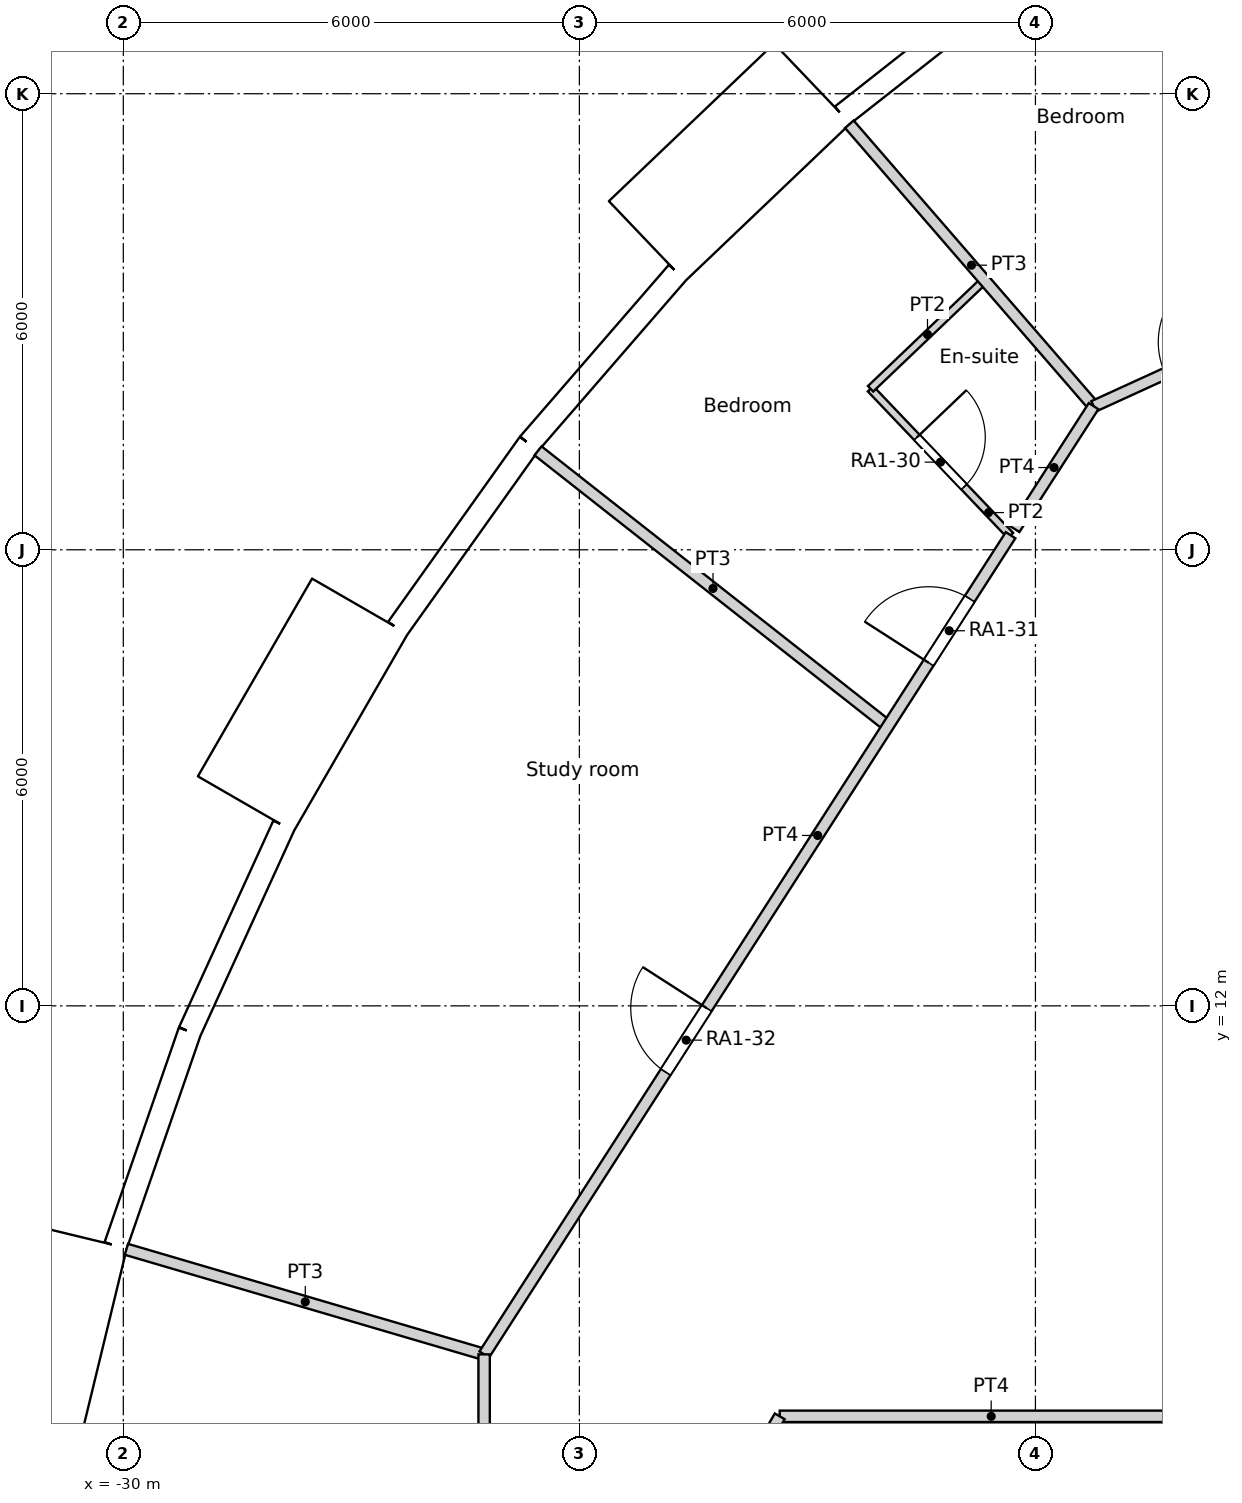
"""IFC4 building model, lengths in metres.
Left out: names, types, materials, properties, quantities, classifications, styles, units other than length and angle.
Written with IfcOpenShell. Run it as: python <this file> out.ifc"""

import sys

from ifc_helpers import new_model, si_unit, direction, frame, frame_2d, origin, origin_2d, place, context, subcontext, project, spatial, rectangle, circle, extrude, element, fill, save


model = new_model("IFC4")
c1 = context("Model", 3, precision=1e-05, world=origin(), true_north=direction((0.0, 1.0)))
c2 = subcontext(c1, "Body", "Model", "MODEL_VIEW")
j1 = project(units=[si_unit("LENGTHUNIT", "METRE"), si_unit("PLANEANGLEUNIT", "RADIAN")], contexts=[c1])
p1 = place(None, origin())
s1 = spatial("IfcSite", under=j1, at=p1, CompositionType="ELEMENT")
p2 = place(p1, origin())
s2 = spatial("IfcBuilding", under=s1, at=p2, CompositionType="ELEMENT")
p3 = place(p2, frame((0.0, 0.0, 28.2)))
s3 = spatial("IfcBuildingStorey", under=s2, at=p3, CompositionType="ELEMENT", Elevation=28.2)
for number, where, z_axis, x_axis in (
    (1, (-19.826, 22.88, 0.0), (0.0, 0.0, 1.0), (1.0, 0.0, 0.0)),
    (2, (-23.797, 18.715, 0.0), (0.0, 0.0, 1.0), (1.0, 0.0, 0.0)),
    (3, (-26.909, 13.873, 0.0), (0.0, 0.0, 1.0), (1.0, 0.0, 0.0)),
    (4, (-29.048, 8.529, 0.0), (0.0, 0.0, 1.0), (1.0, 0.0, 0.0)),
):
    element("IfcColumn", number, at=place(p3, frame(where, z_axis=z_axis, x_axis=x_axis)), inside=s3, PredefinedType="COLUMN", context=c2, shape_type="SweptSolid", body=[
        extrude(circle(Radius=0.7, at=origin_2d()), origin(), (0.0, 0.0, 1.0), 3.6),
    ])
for number, where, z_axis, x_axis in (
    (5, (-16.846, 17.855, 0.0), (0.0, 0.0, 1.0), (1.0, 0.0, 0.0)),
    (6, (-20.509, 13.489, 0.0), (0.0, 0.0, 1.0), (1.0, 0.0, 0.0)),
    (7, (-23.067, 8.396, 0.0), (0.0, 0.0, 1.0), (1.0, 0.0, 0.0)),
):
    element("IfcColumn", number, at=place(p3, frame(where, z_axis=z_axis, x_axis=x_axis)), inside=s3, PredefinedType="COLUMN", context=c2, shape_type="SweptSolid", body=[
        extrude(circle(Radius=0.75, at=origin_2d()), origin(), (0.0, 0.0, 1.0), 3.6),
    ])
p4 = place(p3, frame((-16.958, 8.167, 0.0), z_axis=(0.0, 0.0, 1.0), x_axis=(1.0, 0.0, 0.0)))
e8 = element("IfcColumn", 8, at=p4, inside=s3, PredefinedType="COLUMN", context=c2, shape_type="SweptSolid", body=[
    extrude(circle(Radius=0.8, at=origin_2d()), origin(), (0.0, 0.0, 1.0), 3.6),
])
p5 = place(p3, frame((-18.199, 25.557, 0.0), z_axis=(0.0, 0.0, 1.0), x_axis=(-0.786053834673, -0.618158045322, 0.0)))
e9 = element("IfcWall", 9, at=p5, inside=s3, PredefinedType="SOLIDWALL", context=c2, shape_type="SweptSolid", body=[
    extrude(rectangle(XDim=2.979, YDim=0.3, at=frame_2d((1.49, 0.0))), origin(), (0.0, 0.0, 1.0), 3.15),
])
p6 = place(p5, frame((1.49, 0.0, 1.55)))
e10 = element("IfcOpeningElement", 10, at=p6, cuts=e9, PredefinedType="OPENING", context=c2, shape_type="SweptSolid", body=[
    extrude(circle(Radius=0.9, at=origin_2d()), frame((0.0, 0.16, 0.0), z_axis=(0.0, -1.0, 0.0), x_axis=(1.0, 0.0, 0.0)), (0.0, 0.0, 1.0), 0.32),
])
p7 = place(p3, frame((-20.938, 24.132, -0.45), z_axis=(0.0, 0.0, 1.0), x_axis=(-0.723712023899, -0.690102098579, 0.0)))
e11 = element("IfcWall", 11, at=p7, inside=s3, PredefinedType="ELEMENTEDWALL", context=c2, shape_type="SweptSolid", body=[
    extrude(rectangle(XDim=3.0, YDim=1.45, at=frame_2d((1.5, 0.0))), origin(), (0.0, 0.0, 1.0), 3.6),
])
p8 = place(p7, frame((1.5, 0.0, 2.0)))
e12 = element("IfcOpeningElement", 12, at=p8, cuts=e11, PredefinedType="OPENING", context=c2, shape_type="SweptSolid", body=[
    extrude(circle(Radius=0.9, at=origin_2d()), frame((0.0, 0.735, 0.0), z_axis=(0.0, -1.0, 0.0), x_axis=(1.0, 0.0, 0.0)), (0.0, 0.0, 1.0), 1.47),
])
p9 = place(p3, frame((-22.711, 21.646, 0.0), z_axis=(0.0, 0.0, 1.0), x_axis=(-0.654830712471, -0.755775587066, 0.0)))
e13 = element("IfcWall", 13, at=p9, inside=s3, PredefinedType="SOLIDWALL", context=c2, shape_type="SweptSolid", body=[
    extrude(rectangle(XDim=2.98, YDim=0.3, at=frame_2d((1.49, 0.0))), origin(), (0.0, 0.0, 1.0), 3.15),
])
p10 = place(p9, frame((1.49, 0.0, 1.55)))
e14 = element("IfcOpeningElement", 14, at=p10, cuts=e13, PredefinedType="OPENING", context=c2, shape_type="SweptSolid", body=[
    extrude(circle(Radius=0.9, at=origin_2d()), frame((0.0, 0.16, 0.0), z_axis=(0.0, -1.0, 0.0), x_axis=(1.0, 0.0, 0.0)), (0.0, 0.0, 1.0), 0.32),
])
p11 = place(p3, frame((-24.662, 19.394, 0.0), z_axis=(0.0, 0.0, 1.0), x_axis=(-0.580113774115, -0.814535456, 0.0)))
e15 = element("IfcWall", 15, at=p11, inside=s3, PredefinedType="SOLIDWALL", context=c2, shape_type="SweptSolid", body=[
    extrude(rectangle(XDim=2.98, YDim=0.3, at=frame_2d((1.49, 0.0))), origin(), (0.0, 0.0, 1.0), 3.15),
])
p12 = place(p11, frame((1.49, 0.0, 1.55)))
e16 = element("IfcOpeningElement", 16, at=p12, cuts=e15, PredefinedType="OPENING", context=c2, shape_type="SweptSolid", body=[
    extrude(circle(Radius=0.9, at=origin_2d()), frame((0.0, 0.16, 0.0), z_axis=(0.0, -1.0, 0.0), x_axis=(1.0, 0.0, 0.0)), (0.0, 0.0, 1.0), 0.32),
])
p13 = place(p3, frame((-26.888, 17.256, -0.45), z_axis=(0.0, 0.0, 1.0), x_axis=(-0.499990139034, -0.866031096941, 0.0)))
e17 = element("IfcWall", 17, at=p13, inside=s3, PredefinedType="ELEMENTEDWALL", context=c2, shape_type="SweptSolid", body=[
    extrude(rectangle(XDim=3.0, YDim=1.45, at=frame_2d((1.5, 0.0))), origin(), (0.0, 0.0, 1.0), 3.6),
])
p14 = place(p13, frame((1.5, 0.0, 2.0)))
e18 = element("IfcOpeningElement", 18, at=p14, cuts=e17, PredefinedType="OPENING", context=c2, shape_type="SweptSolid", body=[
    extrude(circle(Radius=0.9, at=origin_2d()), frame((0.0, 0.735, 0.0), z_axis=(0.0, -1.0, 0.0), x_axis=(1.0, 0.0, 0.0)), (0.0, 0.0, 1.0), 1.47),
])
p15 = place(p3, frame((-27.889, 14.371, 0.0), z_axis=(0.0, 0.0, 1.0), x_axis=(-0.415407317162, -0.909635509888, 0.0)))
e19 = element("IfcWall", 19, at=p15, inside=s3, PredefinedType="SOLIDWALL", context=c2, shape_type="SweptSolid", body=[
    extrude(rectangle(XDim=2.98, YDim=0.3, at=frame_2d((1.49, 0.0))), origin(), (0.0, 0.0, 1.0), 3.15),
])
p16 = place(p15, frame((1.49, 0.0, 1.55)))
e20 = element("IfcOpeningElement", 20, at=p16, cuts=e19, PredefinedType="OPENING", context=c2, shape_type="SweptSolid", body=[
    extrude(circle(Radius=0.9, at=origin_2d()), frame((0.0, 0.16, 0.0), z_axis=(0.0, -1.0, 0.0), x_axis=(1.0, 0.0, 0.0)), (0.0, 0.0, 1.0), 0.32),
])
p17 = place(p3, frame((-29.127, 11.661, 0.0), z_axis=(0.0, 0.0, 1.0), x_axis=(-0.327096492592, -0.944990944154, 0.0)))
e21 = element("IfcWall", 21, at=p17, inside=s3, PredefinedType="SOLIDWALL", context=c2, shape_type="SweptSolid", body=[
    extrude(rectangle(XDim=2.979, YDim=0.3, at=frame_2d((1.49, 0.0))), origin(), (0.0, 0.0, 1.0), 3.15),
])
p18 = place(p17, frame((1.49, 0.0, 1.55)))
e22 = element("IfcOpeningElement", 22, at=p18, cuts=e21, PredefinedType="OPENING", context=c2, shape_type="SweptSolid", body=[
    extrude(circle(Radius=0.9, at=origin_2d()), frame((0.0, 0.16, 0.0), z_axis=(0.0, -1.0, 0.0), x_axis=(1.0, 0.0, 0.0)), (0.0, 0.0, 1.0), 0.32),
])
p19 = place(p3, frame((-30.661, 8.982, -0.45), z_axis=(0.0, 0.0, 1.0), x_axis=(-0.235751415068, -0.971813392732, 0.0)))
e23 = element("IfcWall", 23, at=p19, inside=s3, PredefinedType="ELEMENTEDWALL", context=c2, shape_type="SweptSolid", body=[
    extrude(rectangle(XDim=3.0, YDim=1.45, at=frame_2d((1.5, 0.0))), origin(), (0.0, 0.0, 1.0), 3.6),
])
p20 = place(p19, frame((1.5, 0.0, 2.0)))
e24 = element("IfcOpeningElement", 24, at=p20, cuts=e23, PredefinedType="OPENING", context=c2, shape_type="SweptSolid", body=[
    extrude(circle(Radius=0.9, at=origin_2d()), frame((0.0, 0.735, 0.0), z_axis=(0.0, -1.0, 0.0), x_axis=(1.0, 0.0, 0.0)), (0.0, 0.0, 1.0), 1.47),
])
p21 = place(p3, frame((-17.234, 19.888, 0.0), z_axis=(0.0, 0.0, 1.0), x_axis=(0.90953867323, 0.415619299238, 0.0)))
e25 = element("IfcWall", 25, at=p21, inside=s3, PredefinedType="PARTITIONING", context=c2, shape_type="SweptSolid", body=[
    extrude(rectangle(XDim=14.829, YDim=0.15, at=frame_2d((7.415, 0.0))), origin(), (0.0, 0.0, 1.0), 3.15),
])
p22 = place(p21, frame((12.797, 0.0, 0.0)))
e26 = element("IfcOpeningElement", 26, at=p22, cuts=e25, PredefinedType="OPENING", context=c2, shape_type="SweptSolid", body=[
    extrude(rectangle(XDim=1.0, YDim=2.1, at=frame_2d((0.5, 1.05))), frame((0.0, 0.075, 0.0), z_axis=(0.0, -1.0, 0.0), x_axis=(1.0, 0.0, 0.0)), (0.0, 0.0, 1.0), 0.15),
])
p23 = place(p21, frame((7.877, 0.0, 0.0)))
e27 = element("IfcOpeningElement", 27, at=p23, cuts=e25, PredefinedType="OPENING", context=c2, shape_type="SweptSolid", body=[
    extrude(rectangle(XDim=1.0, YDim=2.1, at=frame_2d((0.5, 1.05))), frame((0.0, 0.075, 0.0), z_axis=(0.0, -1.0, 0.0), x_axis=(1.0, 0.0, 0.0)), (0.0, 0.0, 1.0), 0.15),
])
p24 = place(p21, frame((1.034, 0.0, 0.0)))
e28 = element("IfcOpeningElement", 28, at=p24, cuts=e25, PredefinedType="OPENING", context=c2, shape_type="SweptSolid", body=[
    extrude(rectangle(XDim=1.0, YDim=2.1, at=frame_2d((0.5, 1.05))), frame((0.0, 0.075, 0.0), z_axis=(0.0, -1.0, 0.0), x_axis=(1.0, 0.0, 0.0)), (0.0, 0.0, 1.0), 0.15),
])
p25 = place(p3, frame((-18.274, 18.274, 0.0), z_axis=(0.0, 0.0, 1.0), x_axis=(0.540751168176, 0.841182604502, 0.0)))
e29 = element("IfcWall", 29, at=p25, inside=s3, PredefinedType="PARTITIONING", context=c2, shape_type="SweptSolid", body=[
    extrude(rectangle(XDim=1.921, YDim=0.15, at=frame_2d((0.96, 0.0))), origin(), (0.0, 0.0, 1.0), 3.15),
])
p26 = place(p3, frame((-21.364, 6.6, 0.0), z_axis=(0.0, 0.0, 1.0), x_axis=(1.0, 0.0, 0.0)))
e30 = element("IfcWall", 30, at=p26, inside=s3, PredefinedType="PARTITIONING", context=c2, shape_type="SweptSolid", body=[
    extrude(rectangle(XDim=5.564, YDim=0.15, at=frame_2d((2.782, 0.0))), origin(), (0.0, 0.0, 1.0), 3.15),
])
p27 = place(p3, frame((-21.802, 5.842, 0.0), z_axis=(0.0, 0.0, 1.0), x_axis=(0.500277597875, 0.865865073245, 0.0)))
e31 = element("IfcWall", 31, at=p27, inside=s3, PredefinedType="PARTITIONING", context=c2, shape_type="SweptSolid", body=[
    extrude(rectangle(XDim=0.875, YDim=0.15, at=frame_2d((0.438, 0.0))), origin(), (0.0, 0.0, 1.0), 3.15),
])
p28 = place(p3, frame((-25.251, 7.414, 0.0), z_axis=(0.0, 0.0, 1.0), x_axis=(0.540498462047, 0.84134500208, 0.0)))
e32 = element("IfcWall", 32, at=p28, inside=s3, PredefinedType="PARTITIONING", context=c2, shape_type="SweptSolid", body=[
    extrude(rectangle(XDim=12.811, YDim=0.15, at=frame_2d((6.405, 0.0))), origin(), (0.0, 0.0, 1.0), 3.15),
])
p29 = place(p28, frame((10.817, 0.0, 0.0)))
e33 = element("IfcOpeningElement", 33, at=p29, cuts=e32, PredefinedType="OPENING", context=c2, shape_type="SweptSolid", body=[
    extrude(rectangle(XDim=1.0, YDim=2.1, at=frame_2d((0.5, 1.05))), frame((0.0, 0.075, 0.0), z_axis=(0.0, -1.0, 0.0), x_axis=(1.0, 0.0, 0.0)), (0.0, 0.0, 1.0), 0.15),
])
p30 = place(p28, frame((4.415, 0.0, 0.0)))
e34 = element("IfcOpeningElement", 34, at=p30, cuts=e32, PredefinedType="OPENING", context=c2, shape_type="SweptSolid", body=[
    extrude(rectangle(XDim=1.0, YDim=2.04, at=frame_2d((0.5, 1.02))), frame((0.0, 0.075, 0.0), z_axis=(0.0, -1.0, 0.0), x_axis=(1.0, 0.0, 0.0)), (0.0, 0.0, 1.0), 0.15),
])
p31 = place(p3, frame((-25.253, -7.415, 0.0), z_axis=(0.0, 0.0, 1.0), x_axis=(0.0, 1.0, 0.0)))
e35 = element("IfcWall", 35, at=p31, inside=s3, PredefinedType="PARTITIONING", context=c2, shape_type="SweptSolid", body=[
    extrude(rectangle(XDim=14.83, YDim=0.15, at=frame_2d((7.415, 0.0))), origin(), (0.0, 0.0, 1.0), 3.15),
])
p32 = place(p31, frame((12.797, 0.0, 0.0)))
e36 = element("IfcOpeningElement", 36, at=p32, cuts=e35, PredefinedType="OPENING", context=c2, shape_type="SweptSolid", body=[
    extrude(rectangle(XDim=1.0, YDim=2.1, at=frame_2d((0.5, 1.05))), frame((0.0, 0.075, 0.0), z_axis=(0.0, -1.0, 0.0), x_axis=(1.0, 0.0, 0.0)), (0.0, 0.0, 1.0), 0.15),
])
p33 = place(p31, frame((5.954, 0.0, 0.0)))
e37 = element("IfcOpeningElement", 37, at=p33, cuts=e35, PredefinedType="OPENING", context=c2, shape_type="SweptSolid", body=[
    extrude(rectangle(XDim=1.0, YDim=2.1, at=frame_2d((0.5, 1.05))), frame((0.0, 0.075, 0.0), z_axis=(0.0, -1.0, 0.0), x_axis=(1.0, 0.0, 0.0)), (0.0, 0.0, 1.0), 0.15),
])
p34 = place(p31, frame((1.034, 0.0, 0.0)))
e38 = element("IfcOpeningElement", 38, at=p34, cuts=e35, PredefinedType="OPENING", context=c2, shape_type="SweptSolid", body=[
    extrude(rectangle(XDim=1.0, YDim=2.1, at=frame_2d((0.5, 1.05))), frame((0.0, 0.075, 0.0), z_axis=(0.0, -1.0, 0.0), x_axis=(1.0, 0.0, 0.0)), (0.0, 0.0, 1.0), 0.15),
])
p35 = place(p3, frame((-20.448, 23.598, 0.0), z_axis=(0.0, 0.0, 1.0), x_axis=(0.654900226821, -0.755715351776, 0.0)))
e39 = element("IfcWall", 39, at=p35, inside=s3, PredefinedType="PARTITIONING", context=c2, shape_type="SweptSolid", body=[
    extrude(rectangle(XDim=4.906, YDim=0.15, at=frame_2d((2.453, 0.0))), origin(), (0.0, 0.0, 1.0), 3.15),
])
p36 = place(p3, frame((-20.169, 20.118, 0.0), z_axis=(0.0, 0.0, 1.0), x_axis=(0.723537557066, 0.690285016145, 0.0)))
e40 = element("IfcWall", 40, at=p36, inside=s3, PredefinedType="PARTITIONING", context=c2, shape_type="SweptSolid", body=[
    extrude(rectangle(XDim=2.071, YDim=0.1, at=frame_2d((1.035, 0.0))), origin(), (0.0, 0.0, 1.0), 3.15),
])
p37 = place(p3, frame((-20.169, 20.118, 0.0), z_axis=(0.0, 0.0, 1.0), x_axis=(0.690011756227, -0.723798159896, 0.0)))
e41 = element("IfcWall", 41, at=p37, inside=s3, PredefinedType="PARTITIONING", context=c2, shape_type="SweptSolid", body=[
    extrude(rectangle(XDim=2.667, YDim=0.1, at=frame_2d((1.333, 0.0))), origin(), (0.0, 0.0, 1.0), 3.15),
])
p38 = place(p37, frame((0.883, 0.0, 0.0)))
e42 = element("IfcOpeningElement", 42, at=p38, cuts=e41, PredefinedType="OPENING", context=c2, shape_type="SweptSolid", body=[
    extrude(rectangle(XDim=0.9, YDim=2.04, at=frame_2d((0.45, 1.02))), frame((0.0, 0.05, 0.0), z_axis=(0.0, -1.0, 0.0), x_axis=(1.0, 0.0, 0.0)), (0.0, 0.0, 1.0), 0.1),
])
p39 = place(p3, frame((-24.544, 19.302, 0.0), z_axis=(0.0, 0.0, 1.0), x_axis=(0.786014513829, -0.618208042693, 0.0)))
e43 = element("IfcWall", 43, at=p39, inside=s3, PredefinedType="PARTITIONING", context=c2, shape_type="SweptSolid", body=[
    extrude(rectangle(XDim=5.857, YDim=0.15, at=frame_2d((2.929, 0.0))), origin(), (0.0, 0.0, 1.0), 3.15),
])
p40 = place(p3, frame((-29.959, 8.797, 0.0), z_axis=(0.0, 0.0, 1.0), x_axis=(0.959478767209, -0.281780934902, 0.0)))
e44 = element("IfcWall", 44, at=p40, inside=s3, PredefinedType="PARTITIONING", context=c2, shape_type="SweptSolid", body=[
    extrude(rectangle(XDim=4.905, YDim=0.15, at=frame_2d((2.452, 0.0))), origin(), (0.0, 0.0, 1.0), 3.15),
])
p41 = place(p6, origin())
e45 = element("IfcWindow", 45, at=p41, inside=s3, PartitioningType="SINGLE_PANEL", PredefinedType="WINDOW", context=c2, shape_type="SweptSolid", body=[
    extrude(circle(Radius=0.9, at=origin_2d()), frame((0.0, 0.12, 0.0), z_axis=(0.0, -1.0, 0.0), x_axis=(1.0, 0.0, 0.0)), (0.0, 0.0, 1.0), 0.1),
])
fill(e10, e45)
p42 = place(p8, origin())
e46 = element("IfcWindow", 46, at=p42, inside=s3, PartitioningType="SINGLE_PANEL", PredefinedType="WINDOW", context=c2, shape_type="SweptSolid", body=[
    extrude(circle(Radius=0.9, at=origin_2d()), frame((0.0, 0.695, 0.0), z_axis=(0.0, -1.0, 0.0), x_axis=(1.0, 0.0, 0.0)), (0.0, 0.0, 1.0), 0.1),
])
fill(e12, e46)
p43 = place(p10, origin())
e47 = element("IfcWindow", 47, at=p43, inside=s3, PartitioningType="SINGLE_PANEL", PredefinedType="WINDOW", context=c2, shape_type="SweptSolid", body=[
    extrude(circle(Radius=0.9, at=origin_2d()), frame((0.0, 0.12, 0.0), z_axis=(0.0, -1.0, 0.0), x_axis=(1.0, 0.0, 0.0)), (0.0, 0.0, 1.0), 0.1),
])
fill(e14, e47)
p44 = place(p12, origin())
e48 = element("IfcWindow", 48, at=p44, inside=s3, PartitioningType="SINGLE_PANEL", PredefinedType="WINDOW", context=c2, shape_type="SweptSolid", body=[
    extrude(circle(Radius=0.9, at=origin_2d()), frame((0.0, 0.12, 0.0), z_axis=(0.0, -1.0, 0.0), x_axis=(1.0, 0.0, 0.0)), (0.0, 0.0, 1.0), 0.1),
])
fill(e16, e48)
p45 = place(p14, origin())
e49 = element("IfcWindow", 49, at=p45, inside=s3, PartitioningType="SINGLE_PANEL", PredefinedType="WINDOW", context=c2, shape_type="SweptSolid", body=[
    extrude(circle(Radius=0.9, at=origin_2d()), frame((0.0, 0.695, 0.0), z_axis=(0.0, -1.0, 0.0), x_axis=(1.0, 0.0, 0.0)), (0.0, 0.0, 1.0), 0.1),
])
fill(e18, e49)
p46 = place(p16, origin())
e50 = element("IfcWindow", 50, at=p46, inside=s3, PartitioningType="SINGLE_PANEL", PredefinedType="WINDOW", context=c2, shape_type="SweptSolid", body=[
    extrude(circle(Radius=0.9, at=origin_2d()), frame((0.0, 0.12, 0.0), z_axis=(0.0, -1.0, 0.0), x_axis=(1.0, 0.0, 0.0)), (0.0, 0.0, 1.0), 0.1),
])
fill(e20, e50)
p47 = place(p18, origin())
e51 = element("IfcWindow", 51, at=p47, inside=s3, PartitioningType="SINGLE_PANEL", PredefinedType="WINDOW", context=c2, shape_type="SweptSolid", body=[
    extrude(circle(Radius=0.9, at=origin_2d()), frame((0.0, 0.12, 0.0), z_axis=(0.0, -1.0, 0.0), x_axis=(1.0, 0.0, 0.0)), (0.0, 0.0, 1.0), 0.1),
])
fill(e22, e51)
p48 = place(p20, origin())
e52 = element("IfcWindow", 52, at=p48, inside=s3, PartitioningType="SINGLE_PANEL", PredefinedType="WINDOW", context=c2, shape_type="SweptSolid", body=[
    extrude(circle(Radius=0.9, at=origin_2d()), frame((0.0, 0.695, 0.0), z_axis=(0.0, -1.0, 0.0), x_axis=(1.0, 0.0, 0.0)), (0.0, 0.0, 1.0), 0.1),
])
fill(e24, e52)
p49 = place(p38, origin())
e53 = element("IfcDoor", 53, at=p49, inside=s3, OperationType="SINGLE_SWING_LEFT", PredefinedType="DOOR", context=c2, shape_type="SweptSolid", body=[
    extrude(rectangle(XDim=0.9, YDim=2.04, at=frame_2d((0.45, 1.02))), frame((0.0, 0.025, 0.0), z_axis=(0.0, -1.0, 0.0), x_axis=(1.0, 0.0, 0.0)), (0.0, 0.0, 1.0), 0.05),
])
fill(e42, e53)
p50 = place(p29, origin())
e54 = element("IfcDoor", 54, at=p50, inside=s3, OperationType="SINGLE_SWING_LEFT", PredefinedType="DOOR", context=c2, shape_type="SweptSolid", body=[
    extrude(rectangle(XDim=1.0, YDim=2.1, at=frame_2d((0.5, 1.05))), frame((0.0, 0.025, 0.0), z_axis=(0.0, -1.0, 0.0), x_axis=(1.0, 0.0, 0.0)), (0.0, 0.0, 1.0), 0.05),
])
fill(e33, e54)
p51 = place(p30, origin())
e55 = element("IfcDoor", 55, at=p51, inside=s3, OperationType="SINGLE_SWING_RIGHT", PredefinedType="DOOR", context=c2, shape_type="SweptSolid", body=[
    extrude(rectangle(XDim=1.0, YDim=2.04, at=frame_2d((0.5, 1.02))), frame((0.0, 0.025, 0.0), z_axis=(0.0, -1.0, 0.0), x_axis=(1.0, 0.0, 0.0)), (0.0, 0.0, 1.0), 0.05),
])
fill(e34, e55)
save(model, sys.argv[1])
